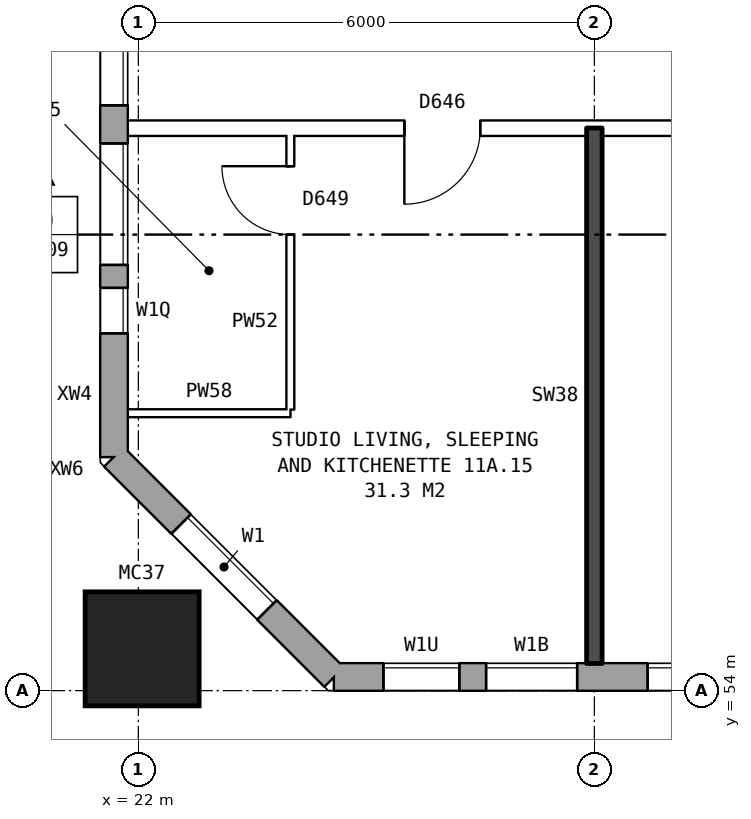
"""IFC4 building model, lengths in metres.
Left out: names, types, materials, properties, quantities, classifications, styles, units other than length and angle.
Written with IfcOpenShell. Run it as: python <this file> out.ifc"""

import sys

from ifc_helpers import new_model, si_unit, direction, frame, frame_2d, origin, origin_2d, place, context, subcontext, project, spatial, rectangle, hollow_rectangle, extrude, element, fill, save


model = new_model("IFC4")
c1 = context("Model", 3, precision=1e-05, world=origin(), true_north=direction((0.0, 1.0)))
c2 = subcontext(c1, "Body", "Model", "MODEL_VIEW")
j1 = project(units=[si_unit("LENGTHUNIT", "METRE"), si_unit("PLANEANGLEUNIT", "RADIAN")], contexts=[c1])
p1 = place(None, origin())
s1 = spatial("IfcSite", under=j1, at=p1, CompositionType="ELEMENT")
p2 = place(p1, origin())
s2 = spatial("IfcBuilding", under=s1, at=p2, CompositionType="ELEMENT")
p3 = place(p2, frame((0.0, 0.0, 44.3)))
s3 = spatial("IfcBuildingStorey", under=s2, at=p3, CompositionType="ELEMENT", Elevation=44.3)
p4 = place(p3, frame((22.05, 54.55, 0.0), z_axis=(0.0, 0.0, 1.0), x_axis=(1.0, 0.0, 0.0)))
e1 = element("IfcColumn", 1, at=p4, inside=s3, PredefinedType="COLUMN", context=c2, shape_type="SweptSolid", body=[
    extrude(hollow_rectangle(XDim=1.5, YDim=1.5, WallThickness=0.08, at=origin_2d()), origin(), (0.0, 0.0, 1.0), 3.1),
])
p5 = place(p3, frame((21.68, 57.075, 0.0), z_axis=(0.0, 0.0, 1.0), x_axis=(0.707106781187, -0.707106781187, 0.0)))
e2 = element("IfcWall", 2, at=p5, inside=s3, PredefinedType="STANDARD", context=c2, shape_type="SweptSolid", body=[
    extrude(rectangle(XDim=4.094, YDim=0.36, at=frame_2d((2.047, 0.0))), origin(), (0.0, 0.0, 1.0), 2.85),
])
p6 = place(p5, frame((1.247, 0.0, 0.8)))
e3 = element("IfcOpeningElement", 3, at=p6, cuts=e2, PredefinedType="OPENING", context=c2, shape_type="SweptSolid", body=[
    extrude(rectangle(XDim=1.6, YDim=1.8, at=frame_2d((0.8, 0.9))), frame((0.0, 0.19, 0.0), z_axis=(0.0, -1.0, 0.0), x_axis=(1.0, 0.0, 0.0)), (0.0, 0.0, 1.0), 0.38),
])
p7 = place(p3, frame((24.575, 54.18, 0.0), z_axis=(0.0, 0.0, 1.0), x_axis=(1.0, 0.0, 0.0)))
e4 = element("IfcWall", 4, at=p7, inside=s3, PredefinedType="STANDARD", context=c2, shape_type="SweptSolid", body=[
    extrude(rectangle(XDim=48.351, YDim=0.36, at=frame_2d((24.175, 0.0))), origin(), (0.0, 0.0, 1.0), 2.85),
])
p8 = place(p7, frame((0.65, 0.0, 0.8)))
e5 = element("IfcOpeningElement", 5, at=p8, cuts=e4, PredefinedType="OPENING", context=c2, shape_type="SweptSolid", body=[
    extrude(rectangle(XDim=1.0, YDim=0.9, at=frame_2d((0.5, 0.45))), frame((0.0, 0.19, 0.0), z_axis=(0.0, -1.0, 0.0), x_axis=(1.0, 0.0, 0.0)), (0.0, 0.0, 1.0), 0.38),
])
p9 = place(p7, frame((4.125, 0.0, 0.8)))
e6 = element("IfcOpeningElement", 6, at=p9, cuts=e4, PredefinedType="OPENING", context=c2, shape_type="SweptSolid", body=[
    extrude(rectangle(XDim=1.6, YDim=1.8, at=frame_2d((0.8, 0.9))), frame((0.0, 0.19, 0.0), z_axis=(0.0, -1.0, 0.0), x_axis=(1.0, 0.0, 0.0)), (0.0, 0.0, 1.0), 0.38),
])
p10 = place(p7, frame((7.125, 0.0, 0.8)))
e7 = element("IfcOpeningElement", 7, at=p10, cuts=e4, PredefinedType="OPENING", context=c2, shape_type="SweptSolid", body=[
    extrude(rectangle(XDim=1.6, YDim=1.8, at=frame_2d((0.8, 0.9))), frame((0.0, 0.19, 0.0), z_axis=(0.0, -1.0, 0.0), x_axis=(1.0, 0.0, 0.0)), (0.0, 0.0, 1.0), 0.38),
])
p11 = place(p7, frame((10.125, 0.0, 0.8)))
e8 = element("IfcOpeningElement", 8, at=p11, cuts=e4, PredefinedType="OPENING", context=c2, shape_type="SweptSolid", body=[
    extrude(rectangle(XDim=1.6, YDim=1.8, at=frame_2d((0.8, 0.9))), frame((0.0, 0.19, 0.0), z_axis=(0.0, -1.0, 0.0), x_axis=(1.0, 0.0, 0.0)), (0.0, 0.0, 1.0), 0.38),
])
p12 = place(p7, frame((13.125, 0.0, 0.8)))
e9 = element("IfcOpeningElement", 9, at=p12, cuts=e4, PredefinedType="OPENING", context=c2, shape_type="SweptSolid", body=[
    extrude(rectangle(XDim=1.6, YDim=1.8, at=frame_2d((0.8, 0.9))), frame((0.0, 0.19, 0.0), z_axis=(0.0, -1.0, 0.0), x_axis=(1.0, 0.0, 0.0)), (0.0, 0.0, 1.0), 0.38),
])
p13 = place(p7, frame((16.125, 0.0, 0.8)))
e10 = element("IfcOpeningElement", 10, at=p13, cuts=e4, PredefinedType="OPENING", context=c2, shape_type="SweptSolid", body=[
    extrude(rectangle(XDim=1.6, YDim=1.8, at=frame_2d((0.8, 0.9))), frame((0.0, 0.19, 0.0), z_axis=(0.0, -1.0, 0.0), x_axis=(1.0, 0.0, 0.0)), (0.0, 0.0, 1.0), 0.38),
])
p14 = place(p7, frame((19.125, 0.0, 0.8)))
e11 = element("IfcOpeningElement", 11, at=p14, cuts=e4, PredefinedType="OPENING", context=c2, shape_type="SweptSolid", body=[
    extrude(rectangle(XDim=1.6, YDim=1.8, at=frame_2d((0.8, 0.9))), frame((0.0, 0.19, 0.0), z_axis=(0.0, -1.0, 0.0), x_axis=(1.0, 0.0, 0.0)), (0.0, 0.0, 1.0), 0.38),
])
p15 = place(p7, frame((22.125, 0.0, 0.8)))
e12 = element("IfcOpeningElement", 12, at=p15, cuts=e4, PredefinedType="OPENING", context=c2, shape_type="SweptSolid", body=[
    extrude(rectangle(XDim=1.6, YDim=1.8, at=frame_2d((0.8, 0.9))), frame((0.0, 0.19, 0.0), z_axis=(0.0, -1.0, 0.0), x_axis=(1.0, 0.0, 0.0)), (0.0, 0.0, 1.0), 0.38),
])
p16 = place(p7, frame((25.125, 0.0, 0.8)))
e13 = element("IfcOpeningElement", 13, at=p16, cuts=e4, PredefinedType="OPENING", context=c2, shape_type="SweptSolid", body=[
    extrude(rectangle(XDim=1.6, YDim=1.8, at=frame_2d((0.8, 0.9))), frame((0.0, 0.19, 0.0), z_axis=(0.0, -1.0, 0.0), x_axis=(1.0, 0.0, 0.0)), (0.0, 0.0, 1.0), 0.38),
])
p17 = place(p7, frame((28.125, 0.0, 0.8)))
e14 = element("IfcOpeningElement", 14, at=p17, cuts=e4, PredefinedType="OPENING", context=c2, shape_type="SweptSolid", body=[
    extrude(rectangle(XDim=1.6, YDim=1.8, at=frame_2d((0.8, 0.9))), frame((0.0, 0.19, 0.0), z_axis=(0.0, -1.0, 0.0), x_axis=(1.0, 0.0, 0.0)), (0.0, 0.0, 1.0), 0.38),
])
p18 = place(p7, frame((31.125, 0.0, 0.8)))
e15 = element("IfcOpeningElement", 15, at=p18, cuts=e4, PredefinedType="OPENING", context=c2, shape_type="SweptSolid", body=[
    extrude(rectangle(XDim=1.6, YDim=1.8, at=frame_2d((0.8, 0.9))), frame((0.0, 0.19, 0.0), z_axis=(0.0, -1.0, 0.0), x_axis=(1.0, 0.0, 0.0)), (0.0, 0.0, 1.0), 0.38),
])
p19 = place(p7, frame((34.125, 0.0, 0.8)))
e16 = element("IfcOpeningElement", 16, at=p19, cuts=e4, PredefinedType="OPENING", context=c2, shape_type="SweptSolid", body=[
    extrude(rectangle(XDim=1.6, YDim=1.8, at=frame_2d((0.8, 0.9))), frame((0.0, 0.19, 0.0), z_axis=(0.0, -1.0, 0.0), x_axis=(1.0, 0.0, 0.0)), (0.0, 0.0, 1.0), 0.38),
])
p20 = place(p7, frame((37.125, 0.0, 0.8)))
e17 = element("IfcOpeningElement", 17, at=p20, cuts=e4, PredefinedType="OPENING", context=c2, shape_type="SweptSolid", body=[
    extrude(rectangle(XDim=1.6, YDim=1.8, at=frame_2d((0.8, 0.9))), frame((0.0, 0.19, 0.0), z_axis=(0.0, -1.0, 0.0), x_axis=(1.0, 0.0, 0.0)), (0.0, 0.0, 1.0), 0.38),
])
p21 = place(p7, frame((40.125, 0.0, 0.8)))
e18 = element("IfcOpeningElement", 18, at=p21, cuts=e4, PredefinedType="OPENING", context=c2, shape_type="SweptSolid", body=[
    extrude(rectangle(XDim=1.6, YDim=1.8, at=frame_2d((0.8, 0.9))), frame((0.0, 0.19, 0.0), z_axis=(0.0, -1.0, 0.0), x_axis=(1.0, 0.0, 0.0)), (0.0, 0.0, 1.0), 0.38),
])
p22 = place(p7, frame((43.125, 0.0, 0.8)))
e19 = element("IfcOpeningElement", 19, at=p22, cuts=e4, PredefinedType="OPENING", context=c2, shape_type="SweptSolid", body=[
    extrude(rectangle(XDim=1.6, YDim=1.8, at=frame_2d((0.8, 0.9))), frame((0.0, 0.19, 0.0), z_axis=(0.0, -1.0, 0.0), x_axis=(1.0, 0.0, 0.0)), (0.0, 0.0, 1.0), 0.38),
])
p23 = place(p7, frame((45.625, 0.0, 0.8)))
e20 = element("IfcOpeningElement", 20, at=p23, cuts=e4, PredefinedType="OPENING", context=c2, shape_type="SweptSolid", body=[
    extrude(rectangle(XDim=1.0, YDim=1.5, at=frame_2d((0.5, 0.75))), frame((0.0, 0.19, 0.0), z_axis=(0.0, -1.0, 0.0), x_axis=(1.0, 0.0, 0.0)), (0.0, 0.0, 1.0), 0.38),
])
p24 = place(p7, frame((2.0, 0.0, 0.8)))
e21 = element("IfcOpeningElement", 21, at=p24, cuts=e4, PredefinedType="OPENING", context=c2, shape_type="SweptSolid", body=[
    extrude(rectangle(XDim=1.2, YDim=1.8, at=frame_2d((0.6, 0.9))), frame((0.0, 0.19, 0.0), z_axis=(0.0, -1.0, 0.0), x_axis=(1.0, 0.0, 0.0)), (0.0, 0.0, 1.0), 0.38),
])
p25 = place(p7, frame((46.925, 0.0, 0.8)))
e22 = element("IfcOpeningElement", 22, at=p25, cuts=e4, PredefinedType="OPENING", context=c2, shape_type="SweptSolid", body=[
    extrude(rectangle(XDim=0.6, YDim=0.9, at=frame_2d((0.3, 0.45))), frame((0.0, 0.19, 0.0), z_axis=(0.0, -1.0, 0.0), x_axis=(1.0, 0.0, 0.0)), (0.0, 0.0, 1.0), 0.38),
])
p26 = place(p3, frame((21.68, 82.925, 0.0), z_axis=(0.0, 0.0, 1.0), x_axis=(0.0, -1.0, 0.0)))
e23 = element("IfcWall", 23, at=p26, inside=s3, PredefinedType="STANDARD", context=c2, shape_type="SweptSolid", body=[
    extrude(rectangle(XDim=25.851, YDim=0.36, at=frame_2d((12.925, 0.0))), origin(), (0.0, 0.0, 1.0), 2.85),
])
p27 = place(p26, frame((0.95, 0.0, 0.8)))
e24 = element("IfcOpeningElement", 24, at=p27, cuts=e23, PredefinedType="OPENING", context=c2, shape_type="SweptSolid", body=[
    extrude(rectangle(XDim=1.2, YDim=0.9, at=frame_2d((0.6, 0.45))), frame((0.0, 0.19, 0.0), z_axis=(0.0, -1.0, 0.0), x_axis=(1.0, 0.0, 0.0)), (0.0, 0.0, 1.0), 0.38),
])
p28 = place(p26, frame((4.625, 0.0, 0.8)))
e25 = element("IfcOpeningElement", 25, at=p28, cuts=e23, PredefinedType="OPENING", context=c2, shape_type="SweptSolid", body=[
    extrude(rectangle(XDim=1.6, YDim=1.8, at=frame_2d((0.8, 0.9))), frame((0.0, 0.19, 0.0), z_axis=(0.0, -1.0, 0.0), x_axis=(1.0, 0.0, 0.0)), (0.0, 0.0, 1.0), 0.38),
])
p29 = place(p26, frame((7.625, 0.0, 0.8)))
e26 = element("IfcOpeningElement", 26, at=p29, cuts=e23, PredefinedType="OPENING", context=c2, shape_type="SweptSolid", body=[
    extrude(rectangle(XDim=1.6, YDim=1.8, at=frame_2d((0.8, 0.9))), frame((0.0, 0.19, 0.0), z_axis=(0.0, -1.0, 0.0), x_axis=(1.0, 0.0, 0.0)), (0.0, 0.0, 1.0), 0.38),
])
p30 = place(p26, frame((10.625, 0.0, 0.8)))
e27 = element("IfcOpeningElement", 27, at=p30, cuts=e23, PredefinedType="OPENING", context=c2, shape_type="SweptSolid", body=[
    extrude(rectangle(XDim=1.6, YDim=1.8, at=frame_2d((0.8, 0.9))), frame((0.0, 0.19, 0.0), z_axis=(0.0, -1.0, 0.0), x_axis=(1.0, 0.0, 0.0)), (0.0, 0.0, 1.0), 0.38),
])
p31 = place(p26, frame((13.625, 0.0, 0.8)))
e28 = element("IfcOpeningElement", 28, at=p31, cuts=e23, PredefinedType="OPENING", context=c2, shape_type="SweptSolid", body=[
    extrude(rectangle(XDim=1.6, YDim=1.8, at=frame_2d((0.8, 0.9))), frame((0.0, 0.19, 0.0), z_axis=(0.0, -1.0, 0.0), x_axis=(1.0, 0.0, 0.0)), (0.0, 0.0, 1.0), 0.38),
])
p32 = place(p26, frame((16.625, 0.0, 0.8)))
e29 = element("IfcOpeningElement", 29, at=p32, cuts=e23, PredefinedType="OPENING", context=c2, shape_type="SweptSolid", body=[
    extrude(rectangle(XDim=1.6, YDim=1.8, at=frame_2d((0.8, 0.9))), frame((0.0, 0.19, 0.0), z_axis=(0.0, -1.0, 0.0), x_axis=(1.0, 0.0, 0.0)), (0.0, 0.0, 1.0), 0.38),
])
p33 = place(p26, frame((19.625, 0.0, 0.8)))
e30 = element("IfcOpeningElement", 30, at=p33, cuts=e23, PredefinedType="OPENING", context=c2, shape_type="SweptSolid", body=[
    extrude(rectangle(XDim=1.6, YDim=1.8, at=frame_2d((0.8, 0.9))), frame((0.0, 0.19, 0.0), z_axis=(0.0, -1.0, 0.0), x_axis=(1.0, 0.0, 0.0)), (0.0, 0.0, 1.0), 0.38),
])
p34 = place(p26, frame((21.725, 0.0, 0.8)))
e31 = element("IfcOpeningElement", 31, at=p34, cuts=e23, PredefinedType="OPENING", context=c2, shape_type="SweptSolid", body=[
    extrude(rectangle(XDim=1.6, YDim=1.8, at=frame_2d((0.8, 0.9))), frame((0.0, 0.19, 0.0), z_axis=(0.0, -1.0, 0.0), x_axis=(1.0, 0.0, 0.0)), (0.0, 0.0, 1.0), 0.38),
])
p35 = place(p26, frame((2.5, 0.0, 0.8)))
e32 = element("IfcOpeningElement", 32, at=p35, cuts=e23, PredefinedType="OPENING", context=c2, shape_type="SweptSolid", body=[
    extrude(rectangle(XDim=1.4, YDim=1.8, at=frame_2d((0.7, 0.9))), frame((0.0, 0.19, 0.0), z_axis=(0.0, -1.0, 0.0), x_axis=(1.0, 0.0, 0.0)), (0.0, 0.0, 1.0), 0.38),
])
p36 = place(p26, frame((23.625, 0.0, 0.8)))
e33 = element("IfcOpeningElement", 33, at=p36, cuts=e23, PredefinedType="OPENING", context=c2, shape_type="SweptSolid", body=[
    extrude(rectangle(XDim=0.6, YDim=1.2, at=frame_2d((0.3, 0.6))), frame((0.0, 0.19, 0.0), z_axis=(0.0, -1.0, 0.0), x_axis=(1.0, 0.0, 0.0)), (0.0, 0.0, 1.0), 0.38),
])
p37 = place(p3, frame((21.86, 57.65, 0.0), z_axis=(0.0, 0.0, 1.0), x_axis=(1.0, 0.0, 0.0)))
e34 = element("IfcWall", 34, at=p37, inside=s3, PredefinedType="PARTITIONING", context=c2, shape_type="SweptSolid", body=[
    extrude(rectangle(XDim=2.14, YDim=0.1, at=frame_2d((1.07, 0.0))), origin(), (0.0, 0.0, 1.0), 2.85),
])
p38 = place(p3, frame((21.86, 61.4, 0.0), z_axis=(0.0, 0.0, 1.0), x_axis=(1.0, 0.0, 0.0)))
e35 = element("IfcWall", 35, at=p38, inside=s3, PredefinedType="PARTITIONING", context=c2, shape_type="SweptSolid", body=[
    extrude(rectangle(XDim=24.04, YDim=0.2, at=frame_2d((12.02, 0.0))), origin(), (0.0, 0.0, 1.0), 2.85),
])
p39 = place(p38, frame((20.59, 0.0, 0.0)))
e36 = element("IfcOpeningElement", 36, at=p39, cuts=e35, PredefinedType="OPENING", context=c2, shape_type="SweptSolid", body=[
    extrude(rectangle(XDim=1.0, YDim=2.1, at=frame_2d((0.5, 1.05))), frame((0.0, 0.11, 0.0), z_axis=(0.0, -1.0, 0.0), x_axis=(1.0, 0.0, 0.0)), (0.0, 0.0, 1.0), 0.22),
])
p40 = place(p38, frame((8.64, 0.0, 0.0)))
e37 = element("IfcOpeningElement", 37, at=p40, cuts=e35, PredefinedType="OPENING", context=c2, shape_type="SweptSolid", body=[
    extrude(rectangle(XDim=1.0, YDim=2.1, at=frame_2d((0.5, 1.05))), frame((0.0, 0.11, 0.0), z_axis=(0.0, -1.0, 0.0), x_axis=(1.0, 0.0, 0.0)), (0.0, 0.0, 1.0), 0.22),
])
p41 = place(p38, frame((3.64, 0.0, 0.0)))
e38 = element("IfcOpeningElement", 38, at=p41, cuts=e35, PredefinedType="OPENING", context=c2, shape_type="SweptSolid", body=[
    extrude(rectangle(XDim=1.0, YDim=2.1, at=frame_2d((0.5, 1.05))), frame((0.0, 0.11, 0.0), z_axis=(0.0, -1.0, 0.0), x_axis=(1.0, 0.0, 0.0)), (0.0, 0.0, 1.0), 0.22),
])
p42 = place(p3, frame((24.0, 57.7, 0.0), z_axis=(0.0, 0.0, 1.0), x_axis=(0.0, 1.0, 0.0)))
e39 = element("IfcWall", 39, at=p42, inside=s3, PredefinedType="PARTITIONING", context=c2, shape_type="SweptSolid", body=[
    extrude(rectangle(XDim=3.6, YDim=0.1, at=frame_2d((1.8, 0.0))), origin(), (0.0, 0.0, 1.0), 2.85),
])
p43 = place(p42, frame((2.3, 0.0, 0.0)))
e40 = element("IfcOpeningElement", 40, at=p43, cuts=e39, PredefinedType="OPENING", context=c2, shape_type="SweptSolid", body=[
    extrude(rectangle(XDim=0.9, YDim=2.1, at=frame_2d((0.45, 1.05))), frame((0.0, 0.06, 0.0), z_axis=(0.0, -1.0, 0.0), x_axis=(1.0, 0.0, 0.0)), (0.0, 0.0, 1.0), 0.12),
])
p44 = place(p3, frame((28.0, 54.36, 0.0), z_axis=(0.0, 0.0, 1.0), x_axis=(0.0, 1.0, 0.0)))
e41 = element("IfcWall", 41, at=p44, inside=s3, PredefinedType="SOLIDWALL", context=c2, shape_type="SweptSolid", body=[
    extrude(rectangle(XDim=7.04, YDim=0.2, at=frame_2d((3.52, 0.0))), origin(), (0.0, 0.0, 1.0), 2.85),
])
p45 = place(p6, origin())
e42 = element("IfcWindow", 42, at=p45, inside=s3, PartitioningType="SINGLE_PANEL", PredefinedType="WINDOW", context=c2, shape_type="SweptSolid", body=[
    extrude(rectangle(XDim=1.6, YDim=1.8, at=frame_2d((0.8, 0.9))), frame((0.0, 0.15, 0.0), z_axis=(0.0, -1.0, 0.0), x_axis=(1.0, 0.0, 0.0)), (0.0, 0.0, 1.0), 0.06),
])
fill(e3, e42)
p46 = place(p8, origin())
e43 = element("IfcWindow", 43, at=p46, inside=s3, PartitioningType="SINGLE_PANEL", PredefinedType="WINDOW", context=c2, shape_type="SweptSolid", body=[
    extrude(rectangle(XDim=1.0, YDim=0.9, at=frame_2d((0.5, 0.45))), frame((0.0, 0.15, 0.0), z_axis=(0.0, -1.0, 0.0), x_axis=(1.0, 0.0, 0.0)), (0.0, 0.0, 1.0), 0.06),
])
fill(e5, e43)
p47 = place(p9, origin())
e44 = element("IfcWindow", 44, at=p47, inside=s3, PartitioningType="SINGLE_PANEL", PredefinedType="WINDOW", context=c2, shape_type="SweptSolid", body=[
    extrude(rectangle(XDim=1.6, YDim=1.8, at=frame_2d((0.8, 0.9))), frame((0.0, 0.15, 0.0), z_axis=(0.0, -1.0, 0.0), x_axis=(1.0, 0.0, 0.0)), (0.0, 0.0, 1.0), 0.06),
])
fill(e6, e44)
p48 = place(p33, origin())
e45 = element("IfcWindow", 45, at=p48, inside=s3, PartitioningType="SINGLE_PANEL", PredefinedType="WINDOW", context=c2, shape_type="SweptSolid", body=[
    extrude(rectangle(XDim=1.6, YDim=1.8, at=frame_2d((0.8, 0.9))), frame((0.0, 0.15, 0.0), z_axis=(0.0, -1.0, 0.0), x_axis=(1.0, 0.0, 0.0)), (0.0, 0.0, 1.0), 0.06),
])
fill(e30, e45)
p49 = place(p34, origin())
e46 = element("IfcWindow", 46, at=p49, inside=s3, PartitioningType="SINGLE_PANEL", PredefinedType="WINDOW", context=c2, shape_type="SweptSolid", body=[
    extrude(rectangle(XDim=1.6, YDim=1.8, at=frame_2d((0.8, 0.9))), frame((0.0, 0.15, 0.0), z_axis=(0.0, -1.0, 0.0), x_axis=(1.0, 0.0, 0.0)), (0.0, 0.0, 1.0), 0.06),
])
fill(e31, e46)
p50 = place(p41, frame((1.0, 0.0, 0.0), z_axis=(0.0, 0.0, 1.0), x_axis=(-1.0, 0.0, 0.0)))
e47 = element("IfcDoor", 47, at=p50, inside=s3, OperationType="SINGLE_SWING_RIGHT", PredefinedType="DOOR", context=c2, shape_type="SweptSolid", body=[
    extrude(rectangle(XDim=1.0, YDim=2.1, at=frame_2d((0.5, 1.05))), frame((0.0, 0.025, 0.0), z_axis=(0.0, -1.0, 0.0), x_axis=(1.0, 0.0, 0.0)), (0.0, 0.0, 1.0), 0.05),
])
fill(e38, e47)
p51 = place(p43, origin())
e48 = element("IfcDoor", 48, at=p51, inside=s3, OperationType="SINGLE_SWING_RIGHT", PredefinedType="DOOR", context=c2, shape_type="SweptSolid", body=[
    extrude(rectangle(XDim=0.9, YDim=2.1, at=frame_2d((0.45, 1.05))), frame((0.0, 0.025, 0.0), z_axis=(0.0, -1.0, 0.0), x_axis=(1.0, 0.0, 0.0)), (0.0, 0.0, 1.0), 0.05),
])
fill(e40, e48)
p52 = place(p24, origin())
e49 = element("IfcWindow", 49, at=p52, inside=s3, PartitioningType="SINGLE_PANEL", PredefinedType="WINDOW", context=c2, shape_type="SweptSolid", body=[
    extrude(rectangle(XDim=1.2, YDim=1.8, at=frame_2d((0.6, 0.9))), frame((0.0, 0.15, 0.0), z_axis=(0.0, -1.0, 0.0), x_axis=(1.0, 0.0, 0.0)), (0.0, 0.0, 1.0), 0.06),
])
fill(e21, e49)
p53 = place(p36, origin())
e50 = element("IfcWindow", 50, at=p53, inside=s3, PartitioningType="SINGLE_PANEL", PredefinedType="WINDOW", context=c2, shape_type="SweptSolid", body=[
    extrude(rectangle(XDim=0.6, YDim=1.2, at=frame_2d((0.3, 0.6))), frame((0.0, 0.15, 0.0), z_axis=(0.0, -1.0, 0.0), x_axis=(1.0, 0.0, 0.0)), (0.0, 0.0, 1.0), 0.06),
])
fill(e33, e50)
save(model, sys.argv[1])
